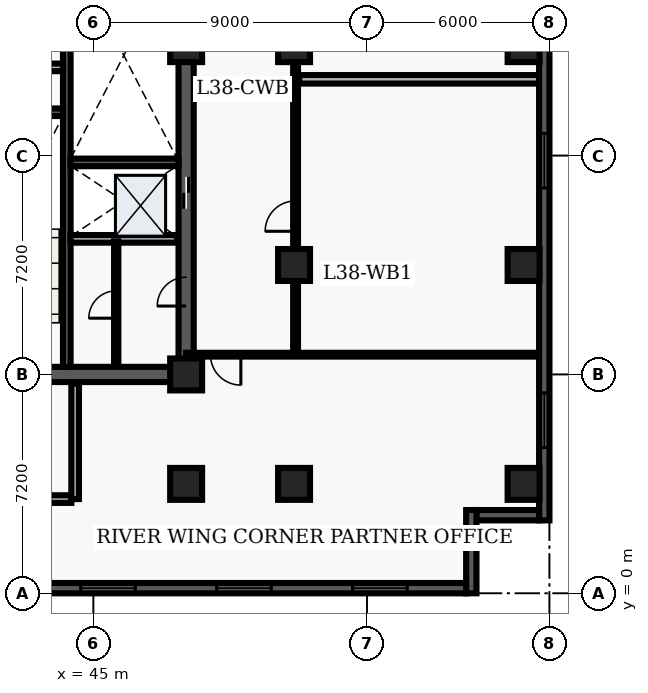
"""IFC4 building model, lengths in metres.
Left out: names, types, materials, properties, quantities, classifications, styles, units other than length and angle.
Written with IfcOpenShell. Run it as: python <this file> out.ifc"""

import sys

from ifc_helpers import new_model, entity, si_unit, converted_unit, direction, frame, origin_with_axes, origin_2d_with_axis, place, context, subcontext, project, spatial, polyline, rectangle, outline, extrude, element, fill, save


model = new_model("IFC4")
c1 = context("Model", 3, precision=1e-05, world=origin_with_axes(), true_north=direction((0.0, 1.0)))
c2 = subcontext(c1, "Body", "Model", "MODEL_VIEW")
j1 = project(units=[si_unit("LENGTHUNIT", "METRE"), converted_unit("PLANEANGLEUNIT", "DEGREE", entity("IfcPlaneAngleMeasure", 0.017), si_unit("PLANEANGLEUNIT", "RADIAN"), dimensions=[0, 0, 0, 0, 0, 0, 0])], contexts=[c1])
p1 = place(None, origin_with_axes())
s1 = spatial("IfcSite", under=j1, at=p1, CompositionType="ELEMENT")
p2 = place(p1, origin_with_axes())
s2 = spatial("IfcBuilding", under=s1, at=p2, CompositionType="ELEMENT")
p3 = place(p2, frame((0.0, 0.0, 156.3), z_axis=(0.0, 0.0, 1.0), x_axis=(1.0, 0.0, 0.0)))
s3 = spatial("IfcBuildingStorey", under=s2, at=p3, CompositionType="ELEMENT", Elevation=156.3)
p4 = place(p3, frame((40.2, 7.2, 0.0), z_axis=(0.0, 0.0, 1.0), x_axis=(1.0, 0.0, 0.0)))
e1 = element("IfcWall", 1, at=p4, inside=s3, PredefinedType="SHEAR", context=c2, shape_type="SweptSolid", body=[
    extrude(outline(polyline([(0.0, -0.25), (7.85, -0.25), (7.85, 0.25), (0.0, 0.25), (0.0, -0.25)])), origin_with_axes(), (0.0, 0.0, 1.0), 3.66),
])
p5 = place(p4, frame((2.175, 0.0, 0.0), z_axis=(0.0, 0.0, 1.0), x_axis=(1.0, 0.0, 0.0)))
e2 = element("IfcOpeningElement", 2, at=p5, cuts=e1, PredefinedType="OPENING", context=c2, shape_type="SweptSolid", body=[
    extrude(rectangle(XDim=1.05, YDim=0.52, at=origin_2d_with_axis()), origin_with_axes(), (0.0, 0.0, 1.0), 2.15),
])
p6 = place(p3, frame((48.05, 7.2, 0.0), z_axis=(0.0, 0.0, 1.0), x_axis=(0.0, 1.0, 0.0)))
e3 = element("IfcWall", 3, at=p6, inside=s3, PredefinedType="SHEAR", context=c2, shape_type="SweptSolid", body=[
    extrude(outline(polyline([(0.0, -0.25), (15.6, -0.25), (15.6, 0.25), (0.0, 0.25), (0.0, -0.25)])), origin_with_axes(), (0.0, 0.0, 1.0), 3.66),
])
p7 = place(p6, frame((5.975, 0.0, 0.0), z_axis=(0.0, 0.0, 1.0), x_axis=(1.0, 0.0, 0.0)))
e4 = element("IfcOpeningElement", 4, at=p7, cuts=e3, PredefinedType="OPENING", context=c2, shape_type="SweptSolid", body=[
    extrude(rectangle(XDim=1.05, YDim=0.52, at=origin_2d_with_axis()), origin_with_axes(), (0.0, 0.0, 1.0), 2.15),
])
p8 = place(p6, frame((2.725, 0.0, 0.0), z_axis=(0.0, 0.0, 1.0), x_axis=(1.0, 0.0, 0.0)))
e5 = element("IfcOpeningElement", 5, at=p8, cuts=e3, PredefinedType="OPENING", context=c2, shape_type="SweptSolid", body=[
    extrude(rectangle(XDim=0.95, YDim=0.52, at=origin_2d_with_axis()), origin_with_axes(), (0.0, 0.0, 1.0), 2.15),
])
p9 = place(p3, frame((44.125, 7.45, 0.0), z_axis=(0.0, 0.0, 1.0), x_axis=(0.0, 1.0, 0.0)))
e6 = element("IfcWall", 6, at=p9, inside=s3, PredefinedType="SHEAR", context=c2, shape_type="SweptSolid", body=[
    extrude(outline(polyline([(0.0, -0.125), (15.1, -0.125), (15.1, 0.125), (0.0, 0.125), (0.0, -0.125)])), origin_with_axes(), (0.0, 0.0, 1.0), 3.66),
])
for number, where, z_axis, x_axis in (
    (7, (40.45, 15.825, 0.0), (0.0, 0.0, 1.0), (1.0, 0.0, 0.0)),
    (8, (44.25, 14.175, 0.0), (0.0, 0.0, 1.0), (1.0, 0.0, 0.0)),
):
    element("IfcWall", number, at=place(p3, frame(where, z_axis=z_axis, x_axis=x_axis)), inside=s3, PredefinedType="SHEAR", context=c2, shape_type="SweptSolid", body=[
        extrude(outline(polyline([(0.0, -0.125), (3.55, -0.125), (3.55, 0.125), (0.0, 0.125), (0.0, -0.125)])), origin_with_axes(), (0.0, 0.0, 1.0), 3.66),
    ])
p10 = place(p3, frame((40.5, 17.3, 0.0), z_axis=(0.0, 0.0, 1.0), x_axis=(1.0, 0.0, 0.0)))
e9 = element("IfcWall", 9, at=p10, inside=s3, PredefinedType="SOLIDWALL", context=c2, shape_type="SweptSolid", body=[
    extrude(outline(polyline([(0.0, -0.125), (3.5, -0.125), (3.5, 0.125), (0.0, 0.125), (0.0, -0.125)])), origin_with_axes(), (0.0, 0.0, 1.0), 2.7),
])
p11 = place(p10, frame((2.4, 0.0, 0.0), z_axis=(0.0, 0.0, 1.0), x_axis=(1.0, 0.0, 0.0)))
e10 = element("IfcOpeningElement", 10, at=p11, cuts=e9, PredefinedType="OPENING", context=c2, shape_type="SweptSolid", body=[
    extrude(rectangle(XDim=0.9, YDim=0.27, at=origin_2d_with_axis()), origin_with_axes(), (0.0, 0.0, 1.0), 2.15),
])
p12 = place(p3, frame((40.325, 3.1, 0.0), z_axis=(0.0, 0.0, 1.0), x_axis=(1.0, 0.0, 0.0)))
e11 = element("IfcWall", 11, at=p12, inside=s3, PredefinedType="SOLIDWALL", context=c2, shape_type="SweptSolid", body=[
    extrude(outline(polyline([(0.0, -0.125), (3.95, -0.125), (3.95, 0.125), (0.0, 0.125), (0.0, -0.125)])), origin_with_axes(), (0.0, 0.0, 1.0), 2.7),
])
p13 = place(p3, frame((44.4, 3.1, 0.0), z_axis=(0.0, 0.0, 1.0), x_axis=(0.0, 1.0, 0.0)))
e12 = element("IfcWall", 12, at=p13, inside=s3, PredefinedType="SOLIDWALL", context=c2, shape_type="SweptSolid", body=[
    extrude(outline(polyline([(0.0, -0.125), (3.8, -0.125), (3.8, 0.125), (0.0, 0.125), (0.0, -0.125)])), origin_with_axes(), (0.0, 0.0, 1.0), 2.7),
])
for number, where, z_axis, x_axis in (
    (13, (48.05, 3.6, 0.0), (0.0, 0.0, 1.0), (1.0, 0.0, 0.0)),
    (14, (48.05, 7.2, 0.0), (0.0, 0.0, 1.0), (1.0, 0.0, 0.0)),
    (15, (48.05, 18.0, 0.0), (0.0, 0.0, 1.0), (1.0, 0.0, 0.0)),
    (16, (51.6, 3.6, 0.0), (0.0, 0.0, 1.0), (1.0, 0.0, 0.0)),
    (17, (51.6, 10.8, 0.0), (0.0, 0.0, 1.0), (1.0, 0.0, 0.0)),
    (18, (51.6, 18.0, 0.0), (0.0, 0.0, 1.0), (1.0, 0.0, 0.0)),
    (19, (59.15, 3.6, 0.0), (0.0, 0.0, 1.0), (1.0, 0.0, 0.0)),
    (20, (59.15, 10.8, 0.0), (0.0, 0.0, 1.0), (1.0, 0.0, 0.0)),
    (21, (59.15, 18.0, 0.0), (0.0, 0.0, 1.0), (1.0, 0.0, 0.0)),
):
    element("IfcColumn", number, at=place(p3, frame(where, z_axis=z_axis, x_axis=x_axis)), inside=s3, PredefinedType="COLUMN", context=c2, shape_type="SweptSolid", body=[
        extrude(rectangle(XDim=1.05, YDim=1.05, at=origin_2d_with_axis()), origin_with_axes(), (0.0, 0.0, 1.0), 3.9),
    ])
p14 = place(p3, frame((44.25, 11.66, 0.0), z_axis=(0.0, 0.0, 1.0), x_axis=(1.0, 0.0, 0.0)))
e22 = element("IfcWall", 22, at=p14, inside=s3, PredefinedType="SOLIDWALL", context=c2, shape_type="SweptSolid", body=[
    extrude(outline(polyline([(0.0, -0.125), (3.5, -0.125), (3.5, 0.125), (0.0, 0.125), (0.0, -0.125)])), origin_with_axes(), (0.0, 0.0, 1.0), 2.7),
])
p15 = place(p3, frame((45.75, 7.5, 0.0), z_axis=(0.0, 0.0, 1.0), x_axis=(0.0, 1.0, 0.0)))
e23 = element("IfcWall", 23, at=p15, inside=s3, PredefinedType="PARTITIONING", context=c2, shape_type="SweptSolid", body=[
    extrude(outline(polyline([(0.0, -0.07), (4.08, -0.07), (4.08, 0.07), (0.0, 0.07), (0.0, -0.07)])), origin_with_axes(), (0.0, 0.0, 1.0), 2.7),
])
p16 = place(p15, frame((2.0, 0.0, 0.0), z_axis=(0.0, 0.0, 1.0), x_axis=(1.0, 0.0, 0.0)))
e24 = element("IfcOpeningElement", 24, at=p16, cuts=e23, PredefinedType="OPENING", context=c2, shape_type="SweptSolid", body=[
    extrude(rectangle(XDim=0.9, YDim=0.16, at=origin_2d_with_axis()), origin_with_axes(), (0.0, 0.0, 1.0), 2.15),
])
p17 = place(p3, frame((51.65, 7.85, 0.0), z_axis=(0.0, 0.0, 1.0), x_axis=(0.0, 1.0, 0.0)))
e25 = element("IfcWall", 25, at=p17, inside=s3, PredefinedType="PARTITIONING", context=c2, shape_type="SweptSolid", body=[
    extrude(outline(polyline([(0.0, -0.08), (18.8, -0.08), (18.8, 0.08), (0.0, 0.08), (0.0, -0.08)])), origin_with_axes(), (0.0, 0.0, 1.0), 2.7),
])
p18 = place(p17, frame((4.559, 0.0, 0.0), z_axis=(0.0, 0.0, 1.0), x_axis=(1.0, 0.0, 0.0)))
e26 = element("IfcOpeningElement", 26, at=p18, cuts=e25, PredefinedType="OPENING", context=c2, shape_type="SweptSolid", body=[
    extrude(rectangle(XDim=1.0, YDim=0.18, at=origin_2d_with_axis()), origin_with_axes(), (0.0, 0.0, 1.0), 2.15),
])
p19 = place(p17, frame((11.523, 0.0, 0.0), z_axis=(0.0, 0.0, 1.0), x_axis=(1.0, 0.0, 0.0)))
e27 = element("IfcOpeningElement", 27, at=p19, cuts=e25, PredefinedType="OPENING", context=c2, shape_type="SweptSolid", body=[
    extrude(rectangle(XDim=1.0, YDim=0.18, at=origin_2d_with_axis()), origin_with_axes(), (0.0, 0.0, 1.0), 2.15),
])
p20 = place(p17, frame((17.733, 0.0, 0.0), z_axis=(0.0, 0.0, 1.0), x_axis=(1.0, 0.0, 0.0)))
e28 = element("IfcOpeningElement", 28, at=p20, cuts=e25, PredefinedType="OPENING", context=c2, shape_type="SweptSolid", body=[
    extrude(rectangle(XDim=1.0, YDim=0.18, at=origin_2d_with_axis()), origin_with_axes(), (0.0, 0.0, 1.0), 2.15),
])
p21 = place(p3, frame((59.665, 7.85, 0.0), z_axis=(0.0, 0.0, 1.0), x_axis=(-1.0, 0.0, 0.0)))
e29 = element("IfcWall", 29, at=p21, inside=s3, PredefinedType="PARTITIONING", context=c2, shape_type="SweptSolid", body=[
    extrude(outline(polyline([(0.0, -0.062), (11.615, -0.062), (11.615, 0.062), (0.0, 0.062), (0.0, -0.062)])), origin_with_axes(), (0.0, 0.0, 1.0), 2.7),
])
p22 = place(p21, frame((10.315, 0.0, 0.0), z_axis=(0.0, 0.0, 1.0), x_axis=(1.0, 0.0, 0.0)))
e30 = element("IfcOpeningElement", 30, at=p22, cuts=e29, PredefinedType="OPENING", context=c2, shape_type="SweptSolid", body=[
    extrude(rectangle(XDim=1.0, YDim=0.145, at=origin_2d_with_axis()), origin_with_axes(), (0.0, 0.0, 1.0), 2.15),
])
p23 = place(p3, frame((51.77, 16.908, 0.0), z_axis=(0.0, 0.0, 1.0), x_axis=(1.0, 0.0, 0.0)))
e31 = element("IfcWall", 31, at=p23, inside=s3, PredefinedType="PARTITIONING", context=c2, shape_type="SweptSolid", body=[
    extrude(outline(polyline([(0.0, -0.14), (7.895, -0.14), (7.895, 0.14), (0.0, 0.14), (0.0, -0.14)])), origin_with_axes(), (0.0, 0.0, 1.0), 2.7),
])
p24 = place(p3, frame((59.83, 26.06, 0.0), z_axis=(0.0, 0.0, 1.0), x_axis=(0.0, -1.0, 0.0)))
e32 = element("IfcWall", 32, at=p24, inside=s3, PredefinedType="SOLIDWALL", context=c2, shape_type="SweptSolid", body=[
    extrude(outline(polyline([(0.0, -0.17), (23.66, -0.17), (23.66, 0.17), (0.0, 0.17), (0.0, -0.17)])), origin_with_axes(), (0.0, 0.0, 1.0), 3.66),
])
p25 = place(p24, frame((11.83, 0.0, 0.45), z_axis=(0.0, 0.0, 1.0), x_axis=(1.0, 0.0, 0.0)))
e33 = element("IfcOpeningElement", 33, at=p25, cuts=e32, PredefinedType="OPENING", context=c2, shape_type="SweptSolid", body=[
    extrude(rectangle(XDim=1.8, YDim=0.36, at=origin_2d_with_axis()), origin_with_axes(), (0.0, 0.0, 1.0), 2.1),
])
p26 = place(p24, frame((20.364, 0.0, 0.45), z_axis=(0.0, 0.0, 1.0), x_axis=(1.0, 0.0, 0.0)))
e34 = element("IfcOpeningElement", 34, at=p26, cuts=e32, PredefinedType="OPENING", context=c2, shape_type="SweptSolid", body=[
    extrude(rectangle(XDim=1.8, YDim=0.36, at=origin_2d_with_axis()), origin_with_axes(), (0.0, 0.0, 1.0), 2.1),
])
p27 = place(p3, frame((59.66, 2.57, 0.0), z_axis=(0.0, 0.0, 1.0), x_axis=(-1.0, 0.0, 0.0)))
e35 = element("IfcWall", 35, at=p27, inside=s3, PredefinedType="SOLIDWALL", context=c2, shape_type="SweptSolid", body=[
    extrude(outline(polyline([(0.0, -0.17), (2.06, -0.17), (2.06, 0.17), (0.0, 0.17), (0.0, -0.17)])), origin_with_axes(), (0.0, 0.0, 1.0), 3.66),
])
p28 = place(p3, frame((57.43, 2.74, 0.0), z_axis=(0.0, 0.0, 1.0), x_axis=(0.0, -1.0, 0.0)))
e36 = element("IfcWall", 36, at=p28, inside=s3, PredefinedType="SOLIDWALL", context=c2, shape_type="SweptSolid", body=[
    extrude(outline(polyline([(0.0, -0.17), (2.74, -0.17), (2.74, 0.17), (0.0, 0.17), (0.0, -0.17)])), origin_with_axes(), (0.0, 0.0, 1.0), 3.66),
])
p29 = place(p3, frame((57.26, 0.17, 0.0), z_axis=(0.0, 0.0, 1.0), x_axis=(-1.0, 0.0, 0.0)))
e37 = element("IfcWall", 37, at=p29, inside=s3, PredefinedType="SOLIDWALL", context=c2, shape_type="SweptSolid", body=[
    extrude(outline(polyline([(0.0, -0.17), (54.86, -0.17), (54.86, 0.17), (0.0, 0.17), (0.0, -0.17)])), origin_with_axes(), (0.0, 0.0, 1.0), 3.66),
])
p30 = place(p29, frame((2.836, 0.0, 0.45), z_axis=(0.0, 0.0, 1.0), x_axis=(1.0, 0.0, 0.0)))
e38 = element("IfcOpeningElement", 38, at=p30, cuts=e37, PredefinedType="OPENING", context=c2, shape_type="SweptSolid", body=[
    extrude(rectangle(XDim=1.8, YDim=0.36, at=origin_2d_with_axis()), origin_with_axes(), (0.0, 0.0, 1.0), 2.1),
])
p31 = place(p29, frame((7.307, 0.0, 0.45), z_axis=(0.0, 0.0, 1.0), x_axis=(1.0, 0.0, 0.0)))
e39 = element("IfcOpeningElement", 39, at=p31, cuts=e37, PredefinedType="OPENING", context=c2, shape_type="SweptSolid", body=[
    extrude(rectangle(XDim=1.8, YDim=0.36, at=origin_2d_with_axis()), origin_with_axes(), (0.0, 0.0, 1.0), 2.1),
])
p32 = place(p29, frame((11.779, 0.0, 0.45), z_axis=(0.0, 0.0, 1.0), x_axis=(1.0, 0.0, 0.0)))
e40 = element("IfcOpeningElement", 40, at=p32, cuts=e37, PredefinedType="OPENING", context=c2, shape_type="SweptSolid", body=[
    extrude(rectangle(XDim=1.8, YDim=0.36, at=origin_2d_with_axis()), origin_with_axes(), (0.0, 0.0, 1.0), 2.1),
])
p33 = place(p29, frame((16.251, 0.0, 0.45), z_axis=(0.0, 0.0, 1.0), x_axis=(1.0, 0.0, 0.0)))
e41 = element("IfcOpeningElement", 41, at=p33, cuts=e37, PredefinedType="OPENING", context=c2, shape_type="SweptSolid", body=[
    extrude(rectangle(XDim=1.8, YDim=0.36, at=origin_2d_with_axis()), origin_with_axes(), (0.0, 0.0, 1.0), 2.1),
])
p34 = place(p29, frame((20.723, 0.0, 0.45), z_axis=(0.0, 0.0, 1.0), x_axis=(1.0, 0.0, 0.0)))
e42 = element("IfcOpeningElement", 42, at=p34, cuts=e37, PredefinedType="OPENING", context=c2, shape_type="SweptSolid", body=[
    extrude(rectangle(XDim=1.8, YDim=0.36, at=origin_2d_with_axis()), origin_with_axes(), (0.0, 0.0, 1.0), 2.1),
])
p35 = place(p29, frame((25.194, 0.0, 0.45), z_axis=(0.0, 0.0, 1.0), x_axis=(1.0, 0.0, 0.0)))
e43 = element("IfcOpeningElement", 43, at=p35, cuts=e37, PredefinedType="OPENING", context=c2, shape_type="SweptSolid", body=[
    extrude(rectangle(XDim=1.8, YDim=0.36, at=origin_2d_with_axis()), origin_with_axes(), (0.0, 0.0, 1.0), 2.1),
])
p36 = place(p29, frame((29.666, 0.0, 0.45), z_axis=(0.0, 0.0, 1.0), x_axis=(1.0, 0.0, 0.0)))
e44 = element("IfcOpeningElement", 44, at=p36, cuts=e37, PredefinedType="OPENING", context=c2, shape_type="SweptSolid", body=[
    extrude(rectangle(XDim=1.8, YDim=0.36, at=origin_2d_with_axis()), origin_with_axes(), (0.0, 0.0, 1.0), 2.1),
])
p37 = place(p29, frame((34.138, 0.0, 0.45), z_axis=(0.0, 0.0, 1.0), x_axis=(1.0, 0.0, 0.0)))
e45 = element("IfcOpeningElement", 45, at=p37, cuts=e37, PredefinedType="OPENING", context=c2, shape_type="SweptSolid", body=[
    extrude(rectangle(XDim=1.8, YDim=0.36, at=origin_2d_with_axis()), origin_with_axes(), (0.0, 0.0, 1.0), 2.1),
])
p38 = place(p29, frame((38.609, 0.0, 0.45), z_axis=(0.0, 0.0, 1.0), x_axis=(1.0, 0.0, 0.0)))
e46 = element("IfcOpeningElement", 46, at=p38, cuts=e37, PredefinedType="OPENING", context=c2, shape_type="SweptSolid", body=[
    extrude(rectangle(XDim=1.8, YDim=0.36, at=origin_2d_with_axis()), origin_with_axes(), (0.0, 0.0, 1.0), 2.1),
])
p39 = place(p29, frame((43.081, 0.0, 0.45), z_axis=(0.0, 0.0, 1.0), x_axis=(1.0, 0.0, 0.0)))
e47 = element("IfcOpeningElement", 47, at=p39, cuts=e37, PredefinedType="OPENING", context=c2, shape_type="SweptSolid", body=[
    extrude(rectangle(XDim=1.8, YDim=0.36, at=origin_2d_with_axis()), origin_with_axes(), (0.0, 0.0, 1.0), 2.1),
])
p40 = place(p29, frame((48.403, 0.0, 0.45), z_axis=(0.0, 0.0, 1.0), x_axis=(1.0, 0.0, 0.0)))
e48 = element("IfcOpeningElement", 48, at=p40, cuts=e37, PredefinedType="OPENING", context=c2, shape_type="SweptSolid", body=[
    extrude(rectangle(XDim=1.8, YDim=0.36, at=origin_2d_with_axis()), origin_with_axes(), (0.0, 0.0, 1.0), 2.1),
])
p41 = place(p29, frame((52.024, 0.0, 0.45), z_axis=(0.0, 0.0, 1.0), x_axis=(1.0, 0.0, 0.0)))
e49 = element("IfcOpeningElement", 49, at=p41, cuts=e37, PredefinedType="OPENING", context=c2, shape_type="SweptSolid", body=[
    extrude(rectangle(XDim=1.8, YDim=0.36, at=origin_2d_with_axis()), origin_with_axes(), (0.0, 0.0, 1.0), 2.1),
])
p42 = place(p6, frame((5.975, 0.0, 0.0), z_axis=(0.0, 0.0, 1.0), x_axis=(1.0, 0.0, 0.0)))
e50 = element("IfcDoor", 50, at=p42, inside=s3, OperationType="SLIDING_TO_LEFT", PredefinedType="DOOR", context=c2, shape_type="SweptSolid", body=[
    extrude(rectangle(XDim=1.05, YDim=0.09, at=origin_2d_with_axis()), origin_with_axes(), (0.0, 0.0, 1.0), 2.15),
])
fill(e4, e50)
p43 = place(p15, frame((2.0, 0.0, 0.0), z_axis=(0.0, 0.0, 1.0), x_axis=(1.0, 0.0, 0.0)))
e51 = element("IfcDoor", 51, at=p43, inside=s3, OperationType="SINGLE_SWING_LEFT", PredefinedType="DOOR", context=c2, shape_type="SweptSolid", body=[
    extrude(rectangle(XDim=0.9, YDim=0.084, at=origin_2d_with_axis()), origin_with_axes(), (0.0, 0.0, 1.0), 2.15),
])
fill(e24, e51)
p44 = place(p6, frame((2.725, 0.0, 0.0), z_axis=(0.0, 0.0, 1.0), x_axis=(1.0, 0.0, 0.0)))
e52 = element("IfcDoor", 52, at=p44, inside=s3, OperationType="SINGLE_SWING_LEFT", PredefinedType="DOOR", context=c2, shape_type="SweptSolid", body=[
    extrude(rectangle(XDim=0.95, YDim=0.09, at=origin_2d_with_axis()), origin_with_axes(), (0.0, 0.0, 1.0), 2.15),
])
fill(e5, e52)
p45 = place(p21, frame((10.315, 0.0, 0.0), z_axis=(0.0, 0.0, 1.0), x_axis=(1.0, 0.0, 0.0)))
e53 = element("IfcDoor", 53, at=p45, inside=s3, OperationType="SINGLE_SWING_LEFT", PredefinedType="DOOR", context=c2, shape_type="SweptSolid", body=[
    extrude(rectangle(XDim=1.0, YDim=0.075, at=origin_2d_with_axis()), origin_with_axes(), (0.0, 0.0, 1.0), 2.15),
])
fill(e30, e53)
p46 = place(p17, frame((4.559, 0.0, 0.0), z_axis=(0.0, 0.0, 1.0), x_axis=(1.0, 0.0, 0.0)))
e54 = element("IfcDoor", 54, at=p46, inside=s3, OperationType="SINGLE_SWING_LEFT", PredefinedType="DOOR", context=c2, shape_type="SweptSolid", body=[
    extrude(rectangle(XDim=1.0, YDim=0.09, at=origin_2d_with_axis()), origin_with_axes(), (0.0, 0.0, 1.0), 2.15),
])
fill(e26, e54)
p47 = place(p24, frame((11.83, 0.0, 0.45), z_axis=(0.0, 0.0, 1.0), x_axis=(1.0, 0.0, 0.0)))
e55 = element("IfcWindow", 55, at=p47, inside=s3, PredefinedType="WINDOW", context=c2, shape_type="SweptSolid", body=[
    extrude(rectangle(XDim=1.8, YDim=0.09, at=origin_2d_with_axis()), origin_with_axes(), (0.0, 0.0, 1.0), 2.1),
])
fill(e33, e55)
p48 = place(p24, frame((20.364, 0.0, 0.45), z_axis=(0.0, 0.0, 1.0), x_axis=(1.0, 0.0, 0.0)))
e56 = element("IfcWindow", 56, at=p48, inside=s3, PredefinedType="WINDOW", context=c2, shape_type="SweptSolid", body=[
    extrude(rectangle(XDim=1.8, YDim=0.09, at=origin_2d_with_axis()), origin_with_axes(), (0.0, 0.0, 1.0), 2.1),
])
fill(e34, e56)
p49 = place(p29, frame((2.836, 0.0, 0.45), z_axis=(0.0, 0.0, 1.0), x_axis=(1.0, 0.0, 0.0)))
e57 = element("IfcWindow", 57, at=p49, inside=s3, PredefinedType="WINDOW", context=c2, shape_type="SweptSolid", body=[
    extrude(rectangle(XDim=1.8, YDim=0.09, at=origin_2d_with_axis()), origin_with_axes(), (0.0, 0.0, 1.0), 2.1),
])
fill(e38, e57)
p50 = place(p29, frame((7.307, 0.0, 0.45), z_axis=(0.0, 0.0, 1.0), x_axis=(1.0, 0.0, 0.0)))
e58 = element("IfcWindow", 58, at=p50, inside=s3, PredefinedType="WINDOW", context=c2, shape_type="SweptSolid", body=[
    extrude(rectangle(XDim=1.8, YDim=0.09, at=origin_2d_with_axis()), origin_with_axes(), (0.0, 0.0, 1.0), 2.1),
])
fill(e39, e58)
p51 = place(p29, frame((11.779, 0.0, 0.45), z_axis=(0.0, 0.0, 1.0), x_axis=(1.0, 0.0, 0.0)))
e59 = element("IfcWindow", 59, at=p51, inside=s3, PredefinedType="WINDOW", context=c2, shape_type="SweptSolid", body=[
    extrude(rectangle(XDim=1.8, YDim=0.09, at=origin_2d_with_axis()), origin_with_axes(), (0.0, 0.0, 1.0), 2.1),
])
fill(e40, e59)
save(model, sys.argv[1])
